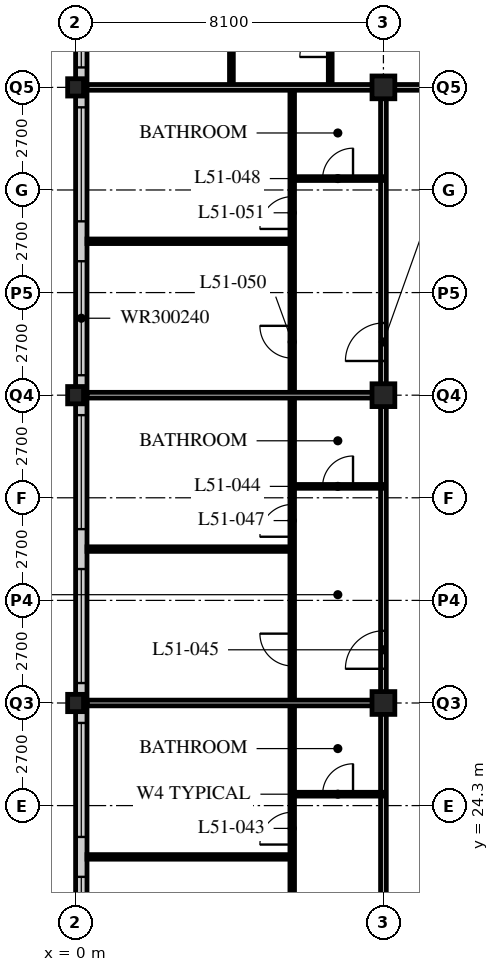
"""IFC4 building model, lengths in metres.
Left out: names, types, materials, properties, quantities, classifications, styles, units other than length and angle.
Written with IfcOpenShell. Run it as: python <this file> out.ifc"""

import sys

from ifc_helpers import new_model, si_unit, direction, frame, frame_2d, origin, origin_2d, place, context, subcontext, project, spatial, rectangle, hollow_rectangle, i_section, extrude, element, fill, save


model = new_model("IFC4")
c1 = context("Model", 3, precision=1e-05, world=origin(), true_north=direction((0.0, 1.0)))
c2 = subcontext(c1, "Body", "Model", "MODEL_VIEW")
j1 = project(units=[si_unit("LENGTHUNIT", "METRE"), si_unit("PLANEANGLEUNIT", "RADIAN")], contexts=[c1])
p1 = place(None, origin())
s1 = spatial("IfcSite", under=j1, at=p1, CompositionType="ELEMENT")
p2 = place(p1, origin())
s2 = spatial("IfcBuilding", under=s1, at=p2, CompositionType="ELEMENT")
p3 = place(p2, frame((0.0, 0.0, 199.2)))
s3 = spatial("IfcBuildingStorey", under=s2, at=p3, CompositionType="ELEMENT", Elevation=199.2)
for number, where, z_axis, x_axis in (
    (1, (0.0, 27.0, 0.0), (0.0, 0.0, 1.0), (1.0, 0.0, 0.0)),
    (2, (0.0, 35.1, 0.0), (0.0, 0.0, 1.0), (1.0, 0.0, 0.0)),
    (3, (0.0, 43.2, 0.0), (0.0, 0.0, 1.0), (1.0, 0.0, 0.0)),
):
    element("IfcColumn", number, at=place(p3, frame(where, z_axis=z_axis, x_axis=x_axis)), inside=s3, PredefinedType="COLUMN", context=c2, shape_type="SweptSolid", body=[
        extrude(i_section(OverallWidth=0.418, OverallDepth=0.456, WebThickness=0.042, FlangeThickness=0.067, FilletRadius=0.015, at=origin_2d()), origin(), (0.0, 0.0, 1.0), 3.6),
    ])
for number, where, z_axis, x_axis in (
    (4, (8.1, 27.0, 0.0), (0.0, 0.0, 1.0), (1.0, 0.0, 0.0)),
    (5, (8.1, 35.1, 0.0), (0.0, 0.0, 1.0), (1.0, 0.0, 0.0)),
    (6, (8.1, 43.2, 0.0), (0.0, 0.0, 1.0), (1.0, 0.0, 0.0)),
):
    element("IfcColumn", number, at=place(p3, frame(where, z_axis=z_axis, x_axis=x_axis)), inside=s3, PredefinedType="COLUMN", context=c2, shape_type="SweptSolid", body=[
        extrude(hollow_rectangle(XDim=0.6, YDim=0.6, WallThickness=0.05, at=origin_2d()), origin(), (0.0, 0.0, 1.0), 3.6),
    ])
p4 = place(p3, frame((0.15, 51.0, 0.0), z_axis=(0.0, 0.0, 1.0), x_axis=(0.0, -1.0, 0.0)))
e7 = element("IfcWall", 7, at=p4, inside=s3, PredefinedType="SOLIDWALL", context=c2, shape_type="SweptSolid", body=[
    extrude(rectangle(XDim=32.1, YDim=0.3, at=frame_2d((16.05, 0.0))), origin(), (0.0, 0.0, 1.0), 3.39),
])
p5 = place(p4, frame((0.225, 0.0, 0.6)))
e8 = element("IfcOpeningElement", 8, at=p5, cuts=e7, PredefinedType="OPENING", context=c2, shape_type="SweptSolid", body=[
    extrude(rectangle(XDim=3.0, YDim=2.4, at=frame_2d((1.5, 1.2))), frame((0.0, 0.16, 0.0), z_axis=(0.0, -1.0, 0.0), x_axis=(1.0, 0.0, 0.0)), (0.0, 0.0, 1.0), 0.32),
])
p6 = place(p4, frame((4.275, 0.0, 0.6)))
e9 = element("IfcOpeningElement", 9, at=p6, cuts=e7, PredefinedType="OPENING", context=c2, shape_type="SweptSolid", body=[
    extrude(rectangle(XDim=3.0, YDim=2.4, at=frame_2d((1.5, 1.2))), frame((0.0, 0.16, 0.0), z_axis=(0.0, -1.0, 0.0), x_axis=(1.0, 0.0, 0.0)), (0.0, 0.0, 1.0), 0.32),
])
p7 = place(p4, frame((8.325, 0.0, 0.6)))
e10 = element("IfcOpeningElement", 10, at=p7, cuts=e7, PredefinedType="OPENING", context=c2, shape_type="SweptSolid", body=[
    extrude(rectangle(XDim=3.0, YDim=2.4, at=frame_2d((1.5, 1.2))), frame((0.0, 0.16, 0.0), z_axis=(0.0, -1.0, 0.0), x_axis=(1.0, 0.0, 0.0)), (0.0, 0.0, 1.0), 0.32),
])
p8 = place(p4, frame((12.375, 0.0, 0.6)))
e11 = element("IfcOpeningElement", 11, at=p8, cuts=e7, PredefinedType="OPENING", context=c2, shape_type="SweptSolid", body=[
    extrude(rectangle(XDim=3.0, YDim=2.4, at=frame_2d((1.5, 1.2))), frame((0.0, 0.16, 0.0), z_axis=(0.0, -1.0, 0.0), x_axis=(1.0, 0.0, 0.0)), (0.0, 0.0, 1.0), 0.32),
])
p9 = place(p4, frame((16.425, 0.0, 0.6)))
e12 = element("IfcOpeningElement", 12, at=p9, cuts=e7, PredefinedType="OPENING", context=c2, shape_type="SweptSolid", body=[
    extrude(rectangle(XDim=3.0, YDim=2.4, at=frame_2d((1.5, 1.2))), frame((0.0, 0.16, 0.0), z_axis=(0.0, -1.0, 0.0), x_axis=(1.0, 0.0, 0.0)), (0.0, 0.0, 1.0), 0.32),
])
p10 = place(p4, frame((20.475, 0.0, 0.6)))
e13 = element("IfcOpeningElement", 13, at=p10, cuts=e7, PredefinedType="OPENING", context=c2, shape_type="SweptSolid", body=[
    extrude(rectangle(XDim=3.0, YDim=2.4, at=frame_2d((1.5, 1.2))), frame((0.0, 0.16, 0.0), z_axis=(0.0, -1.0, 0.0), x_axis=(1.0, 0.0, 0.0)), (0.0, 0.0, 1.0), 0.32),
])
p11 = place(p4, frame((24.525, 0.0, 0.6)))
e14 = element("IfcOpeningElement", 14, at=p11, cuts=e7, PredefinedType="OPENING", context=c2, shape_type="SweptSolid", body=[
    extrude(rectangle(XDim=3.0, YDim=2.4, at=frame_2d((1.5, 1.2))), frame((0.0, 0.16, 0.0), z_axis=(0.0, -1.0, 0.0), x_axis=(1.0, 0.0, 0.0)), (0.0, 0.0, 1.0), 0.32),
])
p12 = place(p4, frame((28.575, 0.0, 0.6)))
e15 = element("IfcOpeningElement", 15, at=p12, cuts=e7, PredefinedType="OPENING", context=c2, shape_type="SweptSolid", body=[
    extrude(rectangle(XDim=3.0, YDim=2.4, at=frame_2d((1.5, 1.2))), frame((0.0, 0.16, 0.0), z_axis=(0.0, -1.0, 0.0), x_axis=(1.0, 0.0, 0.0)), (0.0, 0.0, 1.0), 0.32),
])
p13 = place(p3, frame((8.1, 43.2, 0.0), z_axis=(0.0, 0.0, 1.0), x_axis=(1.0, 0.0, 0.0)))
e16 = element("IfcWall", 16, at=p13, inside=s3, PredefinedType="PARTITIONING", context=c2, shape_type="SweptSolid", body=[
    extrude(rectangle(XDim=40.5, YDim=0.15, at=frame_2d((20.25, 0.0))), origin(), (0.0, 0.0, 1.0), 2.778),
])
p14 = place(p13, frame((4.45, 0.0, 0.0)))
e17 = element("IfcOpeningElement", 17, at=p14, cuts=e16, PredefinedType="OPENING", context=c2, shape_type="SweptSolid", body=[
    extrude(rectangle(XDim=1.0, YDim=2.1, at=frame_2d((0.5, 1.05))), frame((0.0, 0.085, 0.0), z_axis=(0.0, -1.0, 0.0), x_axis=(1.0, 0.0, 0.0)), (0.0, 0.0, 1.0), 0.17),
])
p15 = place(p13, frame((20.65, 0.0, 0.0)))
e18 = element("IfcOpeningElement", 18, at=p15, cuts=e16, PredefinedType="OPENING", context=c2, shape_type="SweptSolid", body=[
    extrude(rectangle(XDim=1.0, YDim=2.1, at=frame_2d((0.5, 1.05))), frame((0.0, 0.085, 0.0), z_axis=(0.0, -1.0, 0.0), x_axis=(1.0, 0.0, 0.0)), (0.0, 0.0, 1.0), 0.17),
])
p16 = place(p13, frame((28.75, 0.0, 0.0)))
e19 = element("IfcOpeningElement", 19, at=p16, cuts=e16, PredefinedType="OPENING", context=c2, shape_type="SweptSolid", body=[
    extrude(rectangle(XDim=1.0, YDim=2.1, at=frame_2d((0.5, 1.05))), frame((0.0, 0.085, 0.0), z_axis=(0.0, -1.0, 0.0), x_axis=(1.0, 0.0, 0.0)), (0.0, 0.0, 1.0), 0.17),
])
p17 = place(p13, frame((37.975, 0.0, 0.0)))
e20 = element("IfcOpeningElement", 20, at=p17, cuts=e16, PredefinedType="OPENING", context=c2, shape_type="SweptSolid", body=[
    extrude(rectangle(XDim=1.0, YDim=2.1, at=frame_2d((0.5, 1.05))), frame((0.0, 0.085, 0.0), z_axis=(0.0, -1.0, 0.0), x_axis=(1.0, 0.0, 0.0)), (0.0, 0.0, 1.0), 0.17),
])
p18 = place(p13, frame((1.525, 0.0, 0.0)))
e21 = element("IfcOpeningElement", 21, at=p18, cuts=e16, PredefinedType="OPENING", context=c2, shape_type="SweptSolid", body=[
    extrude(rectangle(XDim=1.0, YDim=2.1, at=frame_2d((0.5, 1.05))), frame((0.0, 0.085, 0.0), z_axis=(0.0, -1.0, 0.0), x_axis=(1.0, 0.0, 0.0)), (0.0, 0.0, 1.0), 0.17),
])
p19 = place(p3, frame((8.1, 18.9, 0.0), z_axis=(0.0, 0.0, 1.0), x_axis=(0.0, 1.0, 0.0)))
e22 = element("IfcWall", 22, at=p19, inside=s3, PredefinedType="PARTITIONING", context=c2, shape_type="SweptSolid", body=[
    extrude(rectangle(XDim=24.3, YDim=0.15, at=frame_2d((12.15, 0.0))), origin(), (0.0, 0.0, 1.0), 2.778),
])
p20 = place(p19, frame((0.9, 0.0, 0.0)))
e23 = element("IfcOpeningElement", 23, at=p20, cuts=e22, PredefinedType="OPENING", context=c2, shape_type="SweptSolid", body=[
    extrude(rectangle(XDim=1.0, YDim=2.1, at=frame_2d((0.5, 1.05))), frame((0.0, 0.085, 0.0), z_axis=(0.0, -1.0, 0.0), x_axis=(1.0, 0.0, 0.0)), (0.0, 0.0, 1.0), 0.17),
])
p21 = place(p19, frame((9.0, 0.0, 0.0)))
e24 = element("IfcOpeningElement", 24, at=p21, cuts=e22, PredefinedType="OPENING", context=c2, shape_type="SweptSolid", body=[
    extrude(rectangle(XDim=1.0, YDim=2.1, at=frame_2d((0.5, 1.05))), frame((0.0, 0.085, 0.0), z_axis=(0.0, -1.0, 0.0), x_axis=(1.0, 0.0, 0.0)), (0.0, 0.0, 1.0), 0.17),
])
p22 = place(p19, frame((17.1, 0.0, 0.0)))
e25 = element("IfcOpeningElement", 25, at=p22, cuts=e22, PredefinedType="OPENING", context=c2, shape_type="SweptSolid", body=[
    extrude(rectangle(XDim=1.0, YDim=2.1, at=frame_2d((0.5, 1.05))), frame((0.0, 0.085, 0.0), z_axis=(0.0, -1.0, 0.0), x_axis=(1.0, 0.0, 0.0)), (0.0, 0.0, 1.0), 0.17),
])
p23 = place(p3, frame((5.7, 18.9, 0.0), z_axis=(0.0, 0.0, 1.0), x_axis=(0.0, 1.0, 0.0)))
e26 = element("IfcWall", 26, at=p23, inside=s3, PredefinedType="PARTITIONING", context=c2, shape_type="SweptSolid", body=[
    extrude(rectangle(XDim=24.3, YDim=0.12, at=frame_2d((12.15, 0.0))), origin(), (0.0, 0.0, 1.0), 3.39),
])
p24 = place(p23, frame((0.975, 0.0, 0.0)))
e27 = element("IfcOpeningElement", 27, at=p24, cuts=e26, PredefinedType="OPENING", context=c2, shape_type="SweptSolid", body=[
    extrude(rectangle(XDim=0.85, YDim=2.1, at=frame_2d((0.425, 1.05))), frame((0.0, 0.07, 0.0), z_axis=(0.0, -1.0, 0.0), x_axis=(1.0, 0.0, 0.0)), (0.0, 0.0, 1.0), 0.14),
])
p25 = place(p23, frame((4.375, 0.0, 0.0)))
e28 = element("IfcOpeningElement", 28, at=p25, cuts=e26, PredefinedType="OPENING", context=c2, shape_type="SweptSolid", body=[
    extrude(rectangle(XDim=0.85, YDim=2.1, at=frame_2d((0.425, 1.05))), frame((0.0, 0.07, 0.0), z_axis=(0.0, -1.0, 0.0), x_axis=(1.0, 0.0, 0.0)), (0.0, 0.0, 1.0), 0.14),
])
p26 = place(p23, frame((9.075, 0.0, 0.0)))
e29 = element("IfcOpeningElement", 29, at=p26, cuts=e26, PredefinedType="OPENING", context=c2, shape_type="SweptSolid", body=[
    extrude(rectangle(XDim=0.85, YDim=2.1, at=frame_2d((0.425, 1.05))), frame((0.0, 0.07, 0.0), z_axis=(0.0, -1.0, 0.0), x_axis=(1.0, 0.0, 0.0)), (0.0, 0.0, 1.0), 0.14),
])
p27 = place(p23, frame((12.475, 0.0, 0.0)))
e30 = element("IfcOpeningElement", 30, at=p27, cuts=e26, PredefinedType="OPENING", context=c2, shape_type="SweptSolid", body=[
    extrude(rectangle(XDim=0.85, YDim=2.1, at=frame_2d((0.425, 1.05))), frame((0.0, 0.07, 0.0), z_axis=(0.0, -1.0, 0.0), x_axis=(1.0, 0.0, 0.0)), (0.0, 0.0, 1.0), 0.14),
])
p28 = place(p23, frame((17.175, 0.0, 0.0)))
e31 = element("IfcOpeningElement", 31, at=p28, cuts=e26, PredefinedType="OPENING", context=c2, shape_type="SweptSolid", body=[
    extrude(rectangle(XDim=0.85, YDim=2.1, at=frame_2d((0.425, 1.05))), frame((0.0, 0.07, 0.0), z_axis=(0.0, -1.0, 0.0), x_axis=(1.0, 0.0, 0.0)), (0.0, 0.0, 1.0), 0.14),
])
p29 = place(p23, frame((20.575, 0.0, 0.0)))
e32 = element("IfcOpeningElement", 32, at=p29, cuts=e26, PredefinedType="OPENING", context=c2, shape_type="SweptSolid", body=[
    extrude(rectangle(XDim=0.85, YDim=2.1, at=frame_2d((0.425, 1.05))), frame((0.0, 0.07, 0.0), z_axis=(0.0, -1.0, 0.0), x_axis=(1.0, 0.0, 0.0)), (0.0, 0.0, 1.0), 0.14),
])
p30 = place(p3, frame((8.1, 24.6, 0.0), z_axis=(0.0, 0.0, 1.0), x_axis=(-1.0, 0.0, 0.0)))
e33 = element("IfcWall", 33, at=p30, inside=s3, PredefinedType="PARTITIONING", context=c2, shape_type="SweptSolid", body=[
    extrude(rectangle(XDim=2.4, YDim=0.1, at=frame_2d((1.2, 0.0))), origin(), (0.0, 0.0, 1.0), 3.39),
])
p31 = place(p30, frame((0.8, 0.0, 0.0)))
e34 = element("IfcOpeningElement", 34, at=p31, cuts=e33, PredefinedType="OPENING", context=c2, shape_type="SweptSolid", body=[
    extrude(rectangle(XDim=0.8, YDim=2.1, at=frame_2d((0.4, 1.05))), frame((0.0, 0.06, 0.0), z_axis=(0.0, -1.0, 0.0), x_axis=(1.0, 0.0, 0.0)), (0.0, 0.0, 1.0), 0.12),
])
p32 = place(p3, frame((5.7, 22.95, 0.0), z_axis=(0.0, 0.0, 1.0), x_axis=(-1.0, 0.0, 0.0)))
e35 = element("IfcWall", 35, at=p32, inside=s3, PredefinedType="PARTITIONING", context=c2, shape_type="SweptSolid", body=[
    extrude(rectangle(XDim=5.4, YDim=0.12, at=frame_2d((2.7, 0.0))), origin(), (0.0, 0.0, 1.0), 3.39),
])
p33 = place(p3, frame((8.1, 27.0, 0.0), z_axis=(0.0, 0.0, 1.0), x_axis=(-1.0, 0.0, 0.0)))
e36 = element("IfcWall", 36, at=p33, inside=s3, PredefinedType="PARTITIONING", context=c2, shape_type="SweptSolid", body=[
    extrude(rectangle(XDim=7.8, YDim=0.15, at=frame_2d((3.9, 0.0))), origin(), (0.0, 0.0, 1.0), 2.778),
])
p34 = place(p3, frame((8.1, 32.7, 0.0), z_axis=(0.0, 0.0, 1.0), x_axis=(-1.0, 0.0, 0.0)))
e37 = element("IfcWall", 37, at=p34, inside=s3, PredefinedType="PARTITIONING", context=c2, shape_type="SweptSolid", body=[
    extrude(rectangle(XDim=2.4, YDim=0.1, at=frame_2d((1.2, 0.0))), origin(), (0.0, 0.0, 1.0), 3.39),
])
p35 = place(p34, frame((0.8, 0.0, 0.0)))
e38 = element("IfcOpeningElement", 38, at=p35, cuts=e37, PredefinedType="OPENING", context=c2, shape_type="SweptSolid", body=[
    extrude(rectangle(XDim=0.8, YDim=2.1, at=frame_2d((0.4, 1.05))), frame((0.0, 0.06, 0.0), z_axis=(0.0, -1.0, 0.0), x_axis=(1.0, 0.0, 0.0)), (0.0, 0.0, 1.0), 0.12),
])
p36 = place(p3, frame((5.7, 31.05, 0.0), z_axis=(0.0, 0.0, 1.0), x_axis=(-1.0, 0.0, 0.0)))
e39 = element("IfcWall", 39, at=p36, inside=s3, PredefinedType="PARTITIONING", context=c2, shape_type="SweptSolid", body=[
    extrude(rectangle(XDim=5.4, YDim=0.12, at=frame_2d((2.7, 0.0))), origin(), (0.0, 0.0, 1.0), 3.39),
])
p37 = place(p3, frame((8.1, 35.1, 0.0), z_axis=(0.0, 0.0, 1.0), x_axis=(-1.0, 0.0, 0.0)))
e40 = element("IfcWall", 40, at=p37, inside=s3, PredefinedType="PARTITIONING", context=c2, shape_type="SweptSolid", body=[
    extrude(rectangle(XDim=7.8, YDim=0.15, at=frame_2d((3.9, 0.0))), origin(), (0.0, 0.0, 1.0), 2.778),
])
p38 = place(p3, frame((8.1, 40.8, 0.0), z_axis=(0.0, 0.0, 1.0), x_axis=(-1.0, 0.0, 0.0)))
e41 = element("IfcWall", 41, at=p38, inside=s3, PredefinedType="PARTITIONING", context=c2, shape_type="SweptSolid", body=[
    extrude(rectangle(XDim=2.4, YDim=0.1, at=frame_2d((1.2, 0.0))), origin(), (0.0, 0.0, 1.0), 3.39),
])
p39 = place(p38, frame((0.8, 0.0, 0.0)))
e42 = element("IfcOpeningElement", 42, at=p39, cuts=e41, PredefinedType="OPENING", context=c2, shape_type="SweptSolid", body=[
    extrude(rectangle(XDim=0.8, YDim=2.1, at=frame_2d((0.4, 1.05))), frame((0.0, 0.06, 0.0), z_axis=(0.0, -1.0, 0.0), x_axis=(1.0, 0.0, 0.0)), (0.0, 0.0, 1.0), 0.12),
])
p40 = place(p3, frame((5.7, 39.15, 0.0), z_axis=(0.0, 0.0, 1.0), x_axis=(-1.0, 0.0, 0.0)))
e43 = element("IfcWall", 43, at=p40, inside=s3, PredefinedType="PARTITIONING", context=c2, shape_type="SweptSolid", body=[
    extrude(rectangle(XDim=5.4, YDim=0.12, at=frame_2d((2.7, 0.0))), origin(), (0.0, 0.0, 1.0), 3.39),
])
p41 = place(p3, frame((6.7, 43.2, 0.0), z_axis=(0.0, 0.0, 1.0), x_axis=(0.0, 1.0, 0.0)))
e44 = element("IfcWall", 44, at=p41, inside=s3, PredefinedType="PARTITIONING", context=c2, shape_type="SweptSolid", body=[
    extrude(rectangle(XDim=2.4, YDim=0.1, at=frame_2d((1.2, 0.0))), origin(), (0.0, 0.0, 1.0), 3.39),
])
p42 = place(p41, frame((0.8, 0.0, 0.0)))
e45 = element("IfcOpeningElement", 45, at=p42, cuts=e44, PredefinedType="OPENING", context=c2, shape_type="SweptSolid", body=[
    extrude(rectangle(XDim=0.8, YDim=2.1, at=frame_2d((0.4, 1.05))), frame((0.0, 0.06, 0.0), z_axis=(0.0, -1.0, 0.0), x_axis=(1.0, 0.0, 0.0)), (0.0, 0.0, 1.0), 0.12),
])
p43 = place(p3, frame((4.1, 43.2, 0.0), z_axis=(0.0, 0.0, 1.0), x_axis=(0.0, 1.0, 0.0)))
e46 = element("IfcWall", 46, at=p43, inside=s3, PredefinedType="PARTITIONING", context=c2, shape_type="SweptSolid", body=[
    extrude(rectangle(XDim=2.4, YDim=0.1, at=frame_2d((1.2, 0.0))), origin(), (0.0, 0.0, 1.0), 3.39),
])
p44 = place(p3, frame((0.3, 43.2, 0.0), z_axis=(0.0, 0.0, 1.0), x_axis=(1.0, 0.0, 0.0)))
e47 = element("IfcWall", 47, at=p44, inside=s3, PredefinedType="PARTITIONING", context=c2, shape_type="SweptSolid", body=[
    extrude(rectangle(XDim=7.8, YDim=0.15, at=frame_2d((3.9, 0.0))), origin(), (0.0, 0.0, 1.0), 2.778),
])
p45 = place(p6, origin())
e48 = element("IfcWindow", 48, at=p45, inside=s3, PartitioningType="SINGLE_PANEL", PredefinedType="WINDOW", context=c2, shape_type="SweptSolid", body=[
    extrude(rectangle(XDim=3.0, YDim=2.4, at=frame_2d((1.5, 1.2))), frame((0.0, 0.03, 0.0), z_axis=(0.0, -1.0, 0.0), x_axis=(1.0, 0.0, 0.0)), (0.0, 0.0, 1.0), 0.06),
])
fill(e9, e48)
p46 = place(p7, origin())
e49 = element("IfcWindow", 49, at=p46, inside=s3, PartitioningType="SINGLE_PANEL", PredefinedType="WINDOW", context=c2, shape_type="SweptSolid", body=[
    extrude(rectangle(XDim=3.0, YDim=2.4, at=frame_2d((1.5, 1.2))), frame((0.0, 0.03, 0.0), z_axis=(0.0, -1.0, 0.0), x_axis=(1.0, 0.0, 0.0)), (0.0, 0.0, 1.0), 0.06),
])
fill(e10, e49)
p47 = place(p8, origin())
e50 = element("IfcWindow", 50, at=p47, inside=s3, PartitioningType="SINGLE_PANEL", PredefinedType="WINDOW", context=c2, shape_type="SweptSolid", body=[
    extrude(rectangle(XDim=3.0, YDim=2.4, at=frame_2d((1.5, 1.2))), frame((0.0, 0.03, 0.0), z_axis=(0.0, -1.0, 0.0), x_axis=(1.0, 0.0, 0.0)), (0.0, 0.0, 1.0), 0.06),
])
fill(e11, e50)
p48 = place(p9, origin())
e51 = element("IfcWindow", 51, at=p48, inside=s3, PartitioningType="SINGLE_PANEL", PredefinedType="WINDOW", context=c2, shape_type="SweptSolid", body=[
    extrude(rectangle(XDim=3.0, YDim=2.4, at=frame_2d((1.5, 1.2))), frame((0.0, 0.03, 0.0), z_axis=(0.0, -1.0, 0.0), x_axis=(1.0, 0.0, 0.0)), (0.0, 0.0, 1.0), 0.06),
])
fill(e12, e51)
p49 = place(p10, origin())
e52 = element("IfcWindow", 52, at=p49, inside=s3, PartitioningType="SINGLE_PANEL", PredefinedType="WINDOW", context=c2, shape_type="SweptSolid", body=[
    extrude(rectangle(XDim=3.0, YDim=2.4, at=frame_2d((1.5, 1.2))), frame((0.0, 0.03, 0.0), z_axis=(0.0, -1.0, 0.0), x_axis=(1.0, 0.0, 0.0)), (0.0, 0.0, 1.0), 0.06),
])
fill(e13, e52)
p50 = place(p11, origin())
e53 = element("IfcWindow", 53, at=p50, inside=s3, PartitioningType="SINGLE_PANEL", PredefinedType="WINDOW", context=c2, shape_type="SweptSolid", body=[
    extrude(rectangle(XDim=3.0, YDim=2.4, at=frame_2d((1.5, 1.2))), frame((0.0, 0.03, 0.0), z_axis=(0.0, -1.0, 0.0), x_axis=(1.0, 0.0, 0.0)), (0.0, 0.0, 1.0), 0.06),
])
fill(e14, e53)
p51 = place(p12, origin())
e54 = element("IfcWindow", 54, at=p51, inside=s3, PartitioningType="SINGLE_PANEL", PredefinedType="WINDOW", context=c2, shape_type="SweptSolid", body=[
    extrude(rectangle(XDim=3.0, YDim=2.4, at=frame_2d((1.5, 1.2))), frame((0.0, 0.03, 0.0), z_axis=(0.0, -1.0, 0.0), x_axis=(1.0, 0.0, 0.0)), (0.0, 0.0, 1.0), 0.06),
])
fill(e15, e54)
p52 = place(p31, origin())
e55 = element("IfcDoor", 55, at=p52, inside=s3, OperationType="SINGLE_SWING_RIGHT", PredefinedType="DOOR", context=c2, shape_type="SweptSolid", body=[
    extrude(rectangle(XDim=0.8, YDim=2.1, at=frame_2d((0.4, 1.05))), frame((0.0, 0.025, 0.0), z_axis=(0.0, -1.0, 0.0), x_axis=(1.0, 0.0, 0.0)), (0.0, 0.0, 1.0), 0.05),
])
fill(e34, e55)
p53 = place(p25, origin())
e56 = element("IfcDoor", 56, at=p53, inside=s3, OperationType="SINGLE_SWING_LEFT", PredefinedType="DOOR", context=c2, shape_type="SweptSolid", body=[
    extrude(rectangle(XDim=0.85, YDim=2.1, at=frame_2d((0.425, 1.05))), frame((0.0, 0.025, 0.0), z_axis=(0.0, -1.0, 0.0), x_axis=(1.0, 0.0, 0.0)), (0.0, 0.0, 1.0), 0.05),
])
fill(e28, e56)
p54 = place(p35, origin())
e57 = element("IfcDoor", 57, at=p54, inside=s3, OperationType="SINGLE_SWING_RIGHT", PredefinedType="DOOR", context=c2, shape_type="SweptSolid", body=[
    extrude(rectangle(XDim=0.8, YDim=2.1, at=frame_2d((0.4, 1.05))), frame((0.0, 0.025, 0.0), z_axis=(0.0, -1.0, 0.0), x_axis=(1.0, 0.0, 0.0)), (0.0, 0.0, 1.0), 0.05),
])
fill(e38, e57)
p55 = place(p21, origin())
e58 = element("IfcDoor", 58, at=p55, inside=s3, OperationType="SINGLE_SWING_LEFT", PredefinedType="DOOR", context=c2, shape_type="SweptSolid", body=[
    extrude(rectangle(XDim=1.0, YDim=2.1, at=frame_2d((0.5, 1.05))), frame((0.0, 0.025, 0.0), z_axis=(0.0, -1.0, 0.0), x_axis=(1.0, 0.0, 0.0)), (0.0, 0.0, 1.0), 0.05),
])
fill(e24, e58)
p56 = place(p26, origin())
e59 = element("IfcDoor", 59, at=p56, inside=s3, OperationType="SINGLE_SWING_RIGHT", PredefinedType="DOOR", context=c2, shape_type="SweptSolid", body=[
    extrude(rectangle(XDim=0.85, YDim=2.1, at=frame_2d((0.425, 1.05))), frame((0.0, 0.025, 0.0), z_axis=(0.0, -1.0, 0.0), x_axis=(1.0, 0.0, 0.0)), (0.0, 0.0, 1.0), 0.05),
])
fill(e29, e59)
p57 = place(p27, origin())
e60 = element("IfcDoor", 60, at=p57, inside=s3, OperationType="SINGLE_SWING_LEFT", PredefinedType="DOOR", context=c2, shape_type="SweptSolid", body=[
    extrude(rectangle(XDim=0.85, YDim=2.1, at=frame_2d((0.425, 1.05))), frame((0.0, 0.025, 0.0), z_axis=(0.0, -1.0, 0.0), x_axis=(1.0, 0.0, 0.0)), (0.0, 0.0, 1.0), 0.05),
])
fill(e30, e60)
p58 = place(p39, origin())
e61 = element("IfcDoor", 61, at=p58, inside=s3, OperationType="SINGLE_SWING_RIGHT", PredefinedType="DOOR", context=c2, shape_type="SweptSolid", body=[
    extrude(rectangle(XDim=0.8, YDim=2.1, at=frame_2d((0.4, 1.05))), frame((0.0, 0.025, 0.0), z_axis=(0.0, -1.0, 0.0), x_axis=(1.0, 0.0, 0.0)), (0.0, 0.0, 1.0), 0.05),
])
fill(e42, e61)
p59 = place(p22, origin())
e62 = element("IfcDoor", 62, at=p59, inside=s3, OperationType="SINGLE_SWING_LEFT", PredefinedType="DOOR", context=c2, shape_type="SweptSolid", body=[
    extrude(rectangle(XDim=1.0, YDim=2.1, at=frame_2d((0.5, 1.05))), frame((0.0, 0.025, 0.0), z_axis=(0.0, -1.0, 0.0), x_axis=(1.0, 0.0, 0.0)), (0.0, 0.0, 1.0), 0.05),
])
fill(e25, e62)
p60 = place(p28, origin())
e63 = element("IfcDoor", 63, at=p60, inside=s3, OperationType="SINGLE_SWING_RIGHT", PredefinedType="DOOR", context=c2, shape_type="SweptSolid", body=[
    extrude(rectangle(XDim=0.85, YDim=2.1, at=frame_2d((0.425, 1.05))), frame((0.0, 0.025, 0.0), z_axis=(0.0, -1.0, 0.0), x_axis=(1.0, 0.0, 0.0)), (0.0, 0.0, 1.0), 0.05),
])
fill(e31, e63)
p61 = place(p29, origin())
e64 = element("IfcDoor", 64, at=p61, inside=s3, OperationType="SINGLE_SWING_LEFT", PredefinedType="DOOR", context=c2, shape_type="SweptSolid", body=[
    extrude(rectangle(XDim=0.85, YDim=2.1, at=frame_2d((0.425, 1.05))), frame((0.0, 0.025, 0.0), z_axis=(0.0, -1.0, 0.0), x_axis=(1.0, 0.0, 0.0)), (0.0, 0.0, 1.0), 0.05),
])
fill(e32, e64)
p62 = place(p42, origin())
e65 = element("IfcDoor", 65, at=p62, inside=s3, OperationType="SINGLE_SWING_LEFT", PredefinedType="DOOR", context=c2, shape_type="SweptSolid", body=[
    extrude(rectangle(XDim=0.8, YDim=2.1, at=frame_2d((0.4, 1.05))), frame((0.0, 0.025, 0.0), z_axis=(0.0, -1.0, 0.0), x_axis=(1.0, 0.0, 0.0)), (0.0, 0.0, 1.0), 0.05),
])
fill(e45, e65)
save(model, sys.argv[1])
